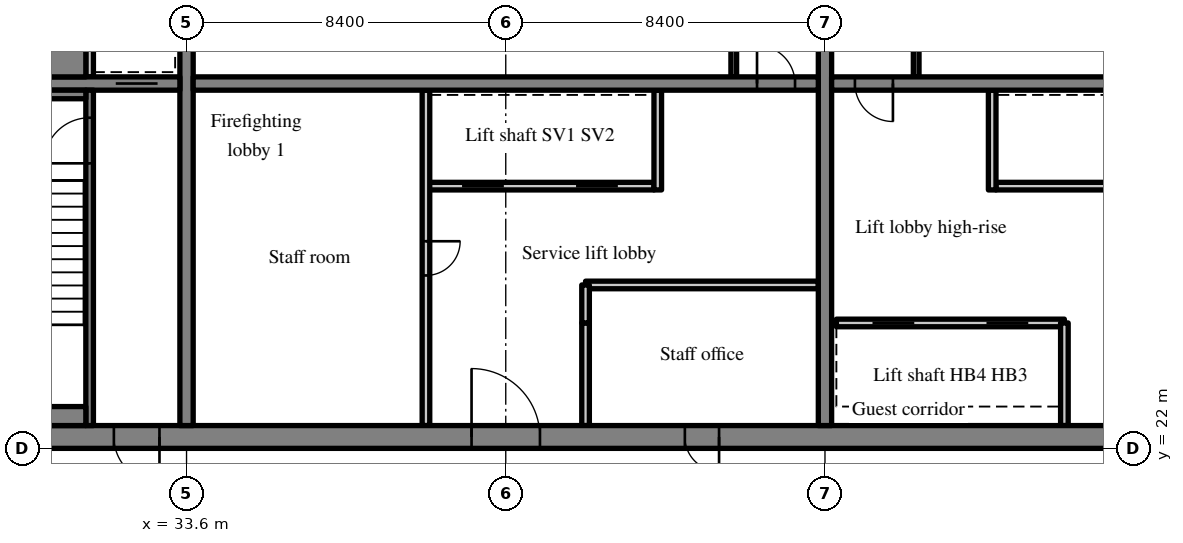
"""IFC4 building model, lengths in metres.
Left out: names, types, materials, properties, quantities, classifications, styles, units other than length and angle.
Written with IfcOpenShell. Run it as: python <this file> out.ifc"""

import sys

from ifc_helpers import new_model, si_unit, direction, frame, frame_2d, origin, place, context, subcontext, project, spatial, rectangle, extrude, source, transform, mapped, element, fill, save


model = new_model("IFC4")
c1 = context("Model", 3, precision=1e-05, world=origin(), true_north=direction((0.0, 1.0)))
c2 = subcontext(c1, "Body", "Model", "MODEL_VIEW")
j1 = project(units=[si_unit("LENGTHUNIT", "METRE"), si_unit("PLANEANGLEUNIT", "RADIAN")], contexts=[c1])
p1 = place(None, origin())
s1 = spatial("IfcSite", under=j1, at=p1, CompositionType="ELEMENT")
p2 = place(p1, origin())
s2 = spatial("IfcBuilding", under=s1, at=p2, CompositionType="ELEMENT")
p3 = place(p2, frame((0.0, 0.0, 256.9)))
s3 = spatial("IfcBuildingStorey", under=s2, at=p3, CompositionType="ELEMENT", Elevation=256.9)
m1 = source(origin(), c2, "Body", "SweptSolid", [
    extrude(rectangle(XDim=50.4, YDim=0.6, at=frame_2d((25.2, 0.0))), origin(), (0.0, 0.0, 1.0), 3.62),
])
p4 = place(p3, frame((25.2, 22.3, 0.0), z_axis=(0.0, 0.0, 1.0), x_axis=(1.0, 0.0, 0.0)))
e1 = element("IfcWall", 1, at=p4, inside=s3, PredefinedType="SHEAR", context=c2, shape_type="MappedRepresentation", body=[
    mapped(m1, transform((0.0, 0.0, 0.0), scale=1.0)),
])
m2 = source(origin(), c2, "Body", "SweptSolid", [
    extrude(rectangle(XDim=1.8, YDim=2.1, at=frame_2d((0.9, 1.05))), frame((0.0, 0.31, 0.0), z_axis=(0.0, -1.0, 0.0), x_axis=(1.0, 0.0, 0.0)), (0.0, 0.0, 1.0), 0.62),
])
p5 = place(p4, frame((15.9, 0.0, 0.0)))
e2 = element("IfcOpeningElement", 2, at=p5, cuts=e1, PredefinedType="OPENING", context=c2, shape_type="MappedRepresentation", body=[
    mapped(m2, transform((0.0, 0.0, 0.0), scale=1.0)),
])
m3 = source(origin(), c2, "Body", "SweptSolid", [
    extrude(rectangle(XDim=0.9, YDim=2.1, at=frame_2d((0.45, 1.05))), frame((0.0, 0.31, 0.0), z_axis=(0.0, -1.0, 0.0), x_axis=(1.0, 0.0, 0.0)), (0.0, 0.0, 1.0), 0.62),
])
p6 = place(p4, frame((21.513, 0.0, 0.0)))
e3 = element("IfcOpeningElement", 3, at=p6, cuts=e1, PredefinedType="OPENING", context=c2, shape_type="MappedRepresentation", body=[
    mapped(m3, transform((0.0, 0.0, 0.0), scale=1.0)),
])
p7 = place(p4, frame((32.7, 0.0, 0.0)))
e4 = element("IfcOpeningElement", 4, at=p7, cuts=e1, PredefinedType="OPENING", context=c2, shape_type="MappedRepresentation", body=[
    mapped(m2, transform((0.0, 0.0, 0.0), scale=1.0)),
])
m4 = source(origin(), c2, "Body", "SweptSolid", [
    extrude(rectangle(XDim=1.2, YDim=2.1, at=frame_2d((0.6, 1.05))), frame((0.0, 0.31, 0.0), z_axis=(0.0, -1.0, 0.0), x_axis=(1.0, 0.0, 0.0)), (0.0, 0.0, 1.0), 0.62),
])
p8 = place(p4, frame((6.488, 0.0, 0.0)))
e5 = element("IfcOpeningElement", 5, at=p8, cuts=e1, PredefinedType="OPENING", context=c2, shape_type="MappedRepresentation", body=[
    mapped(m4, transform((0.0, 0.0, 0.0), scale=1.0)),
])
p9 = place(p4, frame((47.925, 0.0, 0.0)))
e6 = element("IfcOpeningElement", 6, at=p9, cuts=e1, PredefinedType="OPENING", context=c2, shape_type="MappedRepresentation", body=[
    mapped(m4, transform((0.0, 0.0, 0.0), scale=1.0)),
])
m5 = source(origin(), c2, "Body", "SweptSolid", [
    extrude(rectangle(XDim=18.8, YDim=0.35, at=frame_2d((9.4, 0.0))), origin(), (0.0, 0.0, 1.0), 3.62),
])
p10 = place(p3, frame((33.6, 22.6, 0.0), z_axis=(0.0, 0.0, 1.0), x_axis=(0.0, 1.0, 0.0)))
e7 = element("IfcWall", 7, at=p10, inside=s3, PredefinedType="SHEAR", context=c2, shape_type="MappedRepresentation", body=[
    mapped(m5, transform((0.0, 0.0, 0.0), scale=1.0)),
])
m6 = source(origin(), c2, "Body", "SweptSolid", [
    extrude(rectangle(XDim=1.1, YDim=2.1, at=frame_2d((0.55, 1.05))), frame((0.0, 0.185, 0.0), z_axis=(0.0, -1.0, 0.0), x_axis=(1.0, 0.0, 0.0)), (0.0, 0.0, 1.0), 0.37),
])
p11 = place(p10, frame((12.85, 0.0, 0.0)))
e8 = element("IfcOpeningElement", 8, at=p11, cuts=e7, PredefinedType="OPENING", context=c2, shape_type="MappedRepresentation", body=[
    mapped(m6, transform((0.0, 0.0, 0.0), scale=1.0)),
])
p12 = place(p3, frame((50.4, 22.6, 0.0), z_axis=(0.0, 0.0, 1.0), x_axis=(0.0, 1.0, 0.0)))
e9 = element("IfcWall", 9, at=p12, inside=s3, PredefinedType="SHEAR", context=c2, shape_type="MappedRepresentation", body=[
    mapped(m5, transform((0.0, 0.0, 0.0), scale=1.0)),
])
p13 = place(p12, frame((12.85, 0.0, 0.0)))
e10 = element("IfcOpeningElement", 10, at=p13, cuts=e9, PredefinedType="OPENING", context=c2, shape_type="MappedRepresentation", body=[
    mapped(m6, transform((0.0, 0.0, 0.0), scale=1.0)),
])
m7 = source(origin(), c2, "Body", "SweptSolid", [
    extrude(rectangle(XDim=7.625, YDim=0.35, at=frame_2d((3.812, 0.0))), origin(), (0.0, 0.0, 1.0), 3.62),
])
p14 = place(p3, frame((25.8, 31.6, 0.0), z_axis=(0.0, 0.0, 1.0), x_axis=(1.0, 0.0, 0.0)))
e11 = element("IfcWall", 11, at=p14, inside=s3, PredefinedType="SHEAR", context=c2, shape_type="MappedRepresentation", body=[
    mapped(m7, transform((0.0, 0.0, 0.0), scale=1.0)),
])
p15 = place(p14, frame((5.938, 0.0, 0.0)))
e12 = element("IfcOpeningElement", 12, at=p15, cuts=e11, PredefinedType="OPENING", context=c2, shape_type="MappedRepresentation", body=[
    mapped(m6, transform((0.0, 0.0, 0.0), scale=1.0)),
])
m8 = source(origin(), c2, "Body", "SweptSolid", [
    extrude(rectangle(XDim=16.45, YDim=0.35, at=frame_2d((8.225, 0.0))), origin(), (0.0, 0.0, 1.0), 3.62),
])
p16 = place(p3, frame((33.775, 31.6, 0.0), z_axis=(0.0, 0.0, 1.0), x_axis=(1.0, 0.0, 0.0)))
e13 = element("IfcWall", 13, at=p16, inside=s3, PredefinedType="SHEAR", context=c2, shape_type="MappedRepresentation", body=[
    mapped(m8, transform((0.0, 0.0, 0.0), scale=1.0)),
])
m9 = source(origin(), c2, "Body", "SweptSolid", [
    extrude(rectangle(XDim=1.0, YDim=2.1, at=frame_2d((0.5, 1.05))), frame((0.0, 0.185, 0.0), z_axis=(0.0, -1.0, 0.0), x_axis=(1.0, 0.0, 0.0)), (0.0, 0.0, 1.0), 0.37),
])
p17 = place(p16, frame((14.837, 0.0, 0.0)))
e14 = element("IfcOpeningElement", 14, at=p17, cuts=e13, PredefinedType="OPENING", context=c2, shape_type="MappedRepresentation", body=[
    mapped(m9, transform((0.0, 0.0, 0.0), scale=1.0)),
])
m10 = source(origin(), c2, "Body", "SweptSolid", [
    extrude(rectangle(XDim=16.45, YDim=0.35, at=frame_2d((8.225, 0.0))), origin(), (0.0, 0.0, 1.0), 3.62),
])
p18 = place(p3, frame((50.575, 31.6, 0.0), z_axis=(0.0, 0.0, 1.0), x_axis=(1.0, 0.0, 0.0)))
e15 = element("IfcWall", 15, at=p18, inside=s3, PredefinedType="SHEAR", context=c2, shape_type="MappedRepresentation", body=[
    mapped(m10, transform((0.0, 0.0, 0.0), scale=1.0)),
])
p19 = place(p18, frame((0.613, 0.0, 0.0)))
e16 = element("IfcOpeningElement", 16, at=p19, cuts=e15, PredefinedType="OPENING", context=c2, shape_type="MappedRepresentation", body=[
    mapped(m9, transform((0.0, 0.0, 0.0), scale=1.0)),
])
m11 = source(origin(), c2, "Body", "SweptSolid", [
    extrude(rectangle(XDim=6.0, YDim=0.2, at=frame_2d((3.0, 0.0))), origin(), (0.0, 0.0, 1.0), 3.62),
])
p20 = place(p3, frame((39.9, 28.9, 0.0), z_axis=(0.0, 0.0, 1.0), x_axis=(1.0, 0.0, 0.0)))
e17 = element("IfcWall", 17, at=p20, inside=s3, PredefinedType="SOLIDWALL", context=c2, shape_type="MappedRepresentation", body=[
    mapped(m11, transform((0.0, 0.0, 0.0), scale=1.0)),
])
m12 = source(origin(), c2, "Body", "SweptSolid", [
    extrude(rectangle(XDim=1.1, YDim=2.1, at=frame_2d((0.55, 1.05))), frame((0.0, 0.11, 0.0), z_axis=(0.0, -1.0, 0.0), x_axis=(1.0, 0.0, 0.0)), (0.0, 0.0, 1.0), 0.22),
])
p21 = place(p20, frame((0.95, 0.0, 0.0)))
e18 = element("IfcOpeningElement", 18, at=p21, cuts=e17, PredefinedType="OPENING", context=c2, shape_type="MappedRepresentation", body=[
    mapped(m12, transform((0.0, 0.0, 0.0), scale=1.0)),
])
p22 = place(p20, frame((3.95, 0.0, 0.0)))
e19 = element("IfcOpeningElement", 19, at=p22, cuts=e17, PredefinedType="OPENING", context=c2, shape_type="MappedRepresentation", body=[
    mapped(m12, transform((0.0, 0.0, 0.0), scale=1.0)),
])
m13 = source(origin(), c2, "Body", "SweptSolid", [
    extrude(rectangle(XDim=8.825, YDim=0.2, at=frame_2d((4.413, 0.0))), origin(), (0.0, 0.0, 1.0), 3.62),
])
p23 = place(p3, frame((39.9, 22.6, 0.0), z_axis=(0.0, 0.0, 1.0), x_axis=(0.0, 1.0, 0.0)))
e20 = element("IfcWall", 20, at=p23, inside=s3, PredefinedType="PARTITIONING", context=c2, shape_type="MappedRepresentation", body=[
    mapped(m13, transform((0.0, 0.0, 0.0), scale=1.0)),
])
m14 = source(origin(), c2, "Body", "SweptSolid", [
    extrude(rectangle(XDim=0.9, YDim=2.1, at=frame_2d((0.45, 1.05))), frame((0.0, 0.11, 0.0), z_axis=(0.0, -1.0, 0.0), x_axis=(1.0, 0.0, 0.0)), (0.0, 0.0, 1.0), 0.22),
])
p24 = place(p23, frame((3.95, 0.0, 0.0)))
e21 = element("IfcOpeningElement", 21, at=p24, cuts=e20, PredefinedType="OPENING", context=c2, shape_type="MappedRepresentation", body=[
    mapped(m14, transform((0.0, 0.0, 0.0), scale=1.0)),
])
m15 = source(origin(), c2, "Body", "SweptSolid", [
    extrude(rectangle(XDim=2.7, YDim=0.2, at=frame_2d((1.35, 0.0))), origin(), (0.0, 0.0, 1.0), 3.62),
])
p25 = place(p3, frame((44.1, 22.6, 0.0), z_axis=(0.0, 0.0, 1.0), x_axis=(0.0, 1.0, 0.0)))
e22 = element("IfcWall", 22, at=p25, inside=s3, PredefinedType="PARTITIONING", context=c2, shape_type="MappedRepresentation", body=[
    mapped(m15, transform((0.0, 0.0, 0.0), scale=1.0)),
])
m16 = source(origin(), c2, "Body", "SweptSolid", [
    extrude(rectangle(XDim=2.625, YDim=0.2, at=frame_2d((1.312, 0.0))), origin(), (0.0, 0.0, 1.0), 3.62),
])
p26 = place(p3, frame((46.0, 28.8, 0.0), z_axis=(0.0, 0.0, 1.0), x_axis=(0.0, 1.0, 0.0)))
e23 = element("IfcWall", 23, at=p26, inside=s3, PredefinedType="SOLIDWALL", context=c2, shape_type="MappedRepresentation", body=[
    mapped(m16, transform((0.0, 0.0, 0.0), scale=1.0)),
])
m17 = source(origin(), c2, "Body", "SweptSolid", [
    extrude(rectangle(XDim=6.125, YDim=0.2, at=frame_2d((3.062, 0.0))), origin(), (0.0, 0.0, 1.0), 3.62),
])
p27 = place(p3, frame((44.1, 26.3, 0.0), z_axis=(0.0, 0.0, 1.0), x_axis=(1.0, 0.0, 0.0)))
e24 = element("IfcWall", 24, at=p27, inside=s3, PredefinedType="PARTITIONING", context=c2, shape_type="MappedRepresentation", body=[
    mapped(m17, transform((0.0, 0.0, 0.0), scale=1.0)),
])
m18 = source(origin(), c2, "Body", "SweptSolid", [
    extrude(rectangle(XDim=1.0, YDim=0.2, at=frame_2d((0.5, 0.0))), origin(), (0.0, 0.0, 1.0), 3.62),
])
p28 = place(p3, frame((44.1, 25.3, 0.0), z_axis=(0.0, 0.0, 1.0), x_axis=(0.0, 1.0, 0.0)))
e25 = element("IfcWall", 25, at=p28, inside=s3, PredefinedType="PARTITIONING", context=c2, shape_type="MappedRepresentation", body=[
    mapped(m18, transform((0.0, 0.0, 0.0), scale=1.0)),
])
m19 = source(origin(), c2, "Body", "SweptSolid", [
    extrude(rectangle(XDim=3.225, YDim=0.15, at=frame_2d((1.613, 0.0))), origin(), (0.0, 0.0, 1.0), 3.62),
])
p29 = place(p3, frame((48.0, 31.775, 0.0), z_axis=(0.0, 0.0, 1.0), x_axis=(0.0, 1.0, 0.0)))
e26 = element("IfcWall", 26, at=p29, inside=s3, PredefinedType="PARTITIONING", context=c2, shape_type="MappedRepresentation", body=[
    mapped(m19, transform((0.0, 0.0, 0.0), scale=1.0)),
])
p30 = place(p3, frame((56.7, 25.3, 0.0), z_axis=(0.0, 0.0, 1.0), x_axis=(-1.0, 0.0, 0.0)))
e27 = element("IfcWall", 27, at=p30, inside=s3, PredefinedType="SOLIDWALL", context=c2, shape_type="MappedRepresentation", body=[
    mapped(m11, transform((0.0, 0.0, 0.0), scale=1.0)),
])
p31 = place(p30, frame((0.95, 0.0, 0.0)))
e28 = element("IfcOpeningElement", 28, at=p31, cuts=e27, PredefinedType="OPENING", context=c2, shape_type="MappedRepresentation", body=[
    mapped(m12, transform((0.0, 0.0, 0.0), scale=1.0)),
])
p32 = place(p30, frame((3.95, 0.0, 0.0)))
e29 = element("IfcOpeningElement", 29, at=p32, cuts=e27, PredefinedType="OPENING", context=c2, shape_type="MappedRepresentation", body=[
    mapped(m12, transform((0.0, 0.0, 0.0), scale=1.0)),
])
m20 = source(origin(), c2, "Body", "SweptSolid", [
    extrude(rectangle(XDim=12.125, YDim=0.2, at=frame_2d((6.062, 0.0))), origin(), (0.0, 0.0, 1.0), 3.62),
])
p33 = place(p3, frame((67.025, 28.9, 0.0), z_axis=(0.0, 0.0, 1.0), x_axis=(-1.0, 0.0, 0.0)))
e30 = element("IfcWall", 30, at=p33, inside=s3, PredefinedType="SOLIDWALL", context=c2, shape_type="MappedRepresentation", body=[
    mapped(m20, transform((0.0, 0.0, 0.0), scale=1.0)),
])
p34 = place(p33, frame((1.075, 0.0, 0.0)))
e31 = element("IfcOpeningElement", 31, at=p34, cuts=e30, PredefinedType="OPENING", context=c2, shape_type="MappedRepresentation", body=[
    mapped(m12, transform((0.0, 0.0, 0.0), scale=1.0)),
])
p35 = place(p33, frame((4.075, 0.0, 0.0)))
e32 = element("IfcOpeningElement", 32, at=p35, cuts=e30, PredefinedType="OPENING", context=c2, shape_type="MappedRepresentation", body=[
    mapped(m12, transform((0.0, 0.0, 0.0), scale=1.0)),
])
p36 = place(p3, frame((56.7, 22.6, 0.0), z_axis=(0.0, 0.0, 1.0), x_axis=(0.0, 1.0, 0.0)))
e33 = element("IfcWall", 33, at=p36, inside=s3, PredefinedType="SOLIDWALL", context=c2, shape_type="MappedRepresentation", body=[
    mapped(m15, transform((0.0, 0.0, 0.0), scale=1.0)),
])
p37 = place(p3, frame((54.8, 28.8, 0.0), z_axis=(0.0, 0.0, 1.0), x_axis=(0.0, 1.0, 0.0)))
e34 = element("IfcWall", 34, at=p37, inside=s3, PredefinedType="SOLIDWALL", context=c2, shape_type="MappedRepresentation", body=[
    mapped(m16, transform((0.0, 0.0, 0.0), scale=1.0)),
])
p38 = place(p3, frame((52.8, 31.775, 0.0), z_axis=(0.0, 0.0, 1.0), x_axis=(0.0, 1.0, 0.0)))
e35 = element("IfcWall", 35, at=p38, inside=s3, PredefinedType="PARTITIONING", context=c2, shape_type="MappedRepresentation", body=[
    mapped(m19, transform((0.0, 0.0, 0.0), scale=1.0)),
])
m21 = source(origin(), c2, "Body", "SweptSolid", [
    extrude(rectangle(XDim=8.825, YDim=0.2, at=frame_2d((4.413, 0.0))), origin(), (0.0, 0.0, 1.0), 3.62),
])
p39 = place(p3, frame((31.05, 22.6, 0.0), z_axis=(0.0, 0.0, 1.0), x_axis=(0.0, 1.0, 0.0)))
e36 = element("IfcWall", 36, at=p39, inside=s3, PredefinedType="SOLIDWALL", context=c2, shape_type="MappedRepresentation", body=[
    mapped(m21, transform((0.0, 0.0, 0.0), scale=1.0)),
])
m22 = source(origin(), c2, "Body", "SweptSolid", [
    extrude(rectangle(XDim=1.2, YDim=2.1, at=frame_2d((0.6, 1.05))), frame((0.0, 0.11, 0.0), z_axis=(0.0, -1.0, 0.0), x_axis=(1.0, 0.0, 0.0)), (0.0, 0.0, 1.0), 0.22),
])
p40 = place(p39, frame((6.9, 0.0, 0.0)))
e37 = element("IfcOpeningElement", 37, at=p40, cuts=e36, PredefinedType="OPENING", context=c2, shape_type="MappedRepresentation", body=[
    mapped(m22, transform((0.0, 0.0, 0.0), scale=1.0)),
])
m23 = source(origin(), c2, "Body", "SweptSolid", [
    extrude(rectangle(XDim=1.825, YDim=0.2, at=frame_2d((0.913, 0.0))), origin(), (0.0, 0.0, 1.0), 3.62),
])
p41 = place(p3, frame((31.05, 31.775, 0.0), z_axis=(0.0, 0.0, 1.0), x_axis=(0.0, 1.0, 0.0)))
e38 = element("IfcWall", 38, at=p41, inside=s3, PredefinedType="SOLIDWALL", context=c2, shape_type="MappedRepresentation", body=[
    mapped(m23, transform((0.0, 0.0, 0.0), scale=1.0)),
])
m24 = source(origin(), c2, "Body", "SweptSolid", [
    extrude(rectangle(XDim=5.15, YDim=0.5, at=frame_2d((2.575, 0.0))), origin(), (0.0, 0.0, 1.0), 3.62),
])
p42 = place(p3, frame((25.8, 22.85, 0.0), z_axis=(0.0, 0.0, 1.0), x_axis=(1.0, 0.0, 0.0)))
e39 = element("IfcWall", 39, at=p42, inside=s3, PredefinedType="SOLIDWALL", context=c2, shape_type="MappedRepresentation", body=[
    mapped(m24, transform((0.0, 0.0, 0.0), scale=1.0)),
])
m25 = source(origin(), c2, "Body", "SweptSolid", [
    extrude(rectangle(XDim=5.15, YDim=0.225, at=frame_2d((2.575, 0.0))), origin(), (0.0, 0.0, 1.0), 3.62),
])
p43 = place(p3, frame((25.8, 31.312, 0.0), z_axis=(0.0, 0.0, 1.0), x_axis=(1.0, 0.0, 0.0)))
e40 = element("IfcWall", 40, at=p43, inside=s3, PredefinedType="SOLIDWALL", context=c2, shape_type="MappedRepresentation", body=[
    mapped(m25, transform((0.0, 0.0, 0.0), scale=1.0)),
])
m26 = source(origin(), c2, "Body", "SweptSolid", [
    extrude(rectangle(XDim=5.15, YDim=1.025, at=frame_2d((2.575, 0.0))), origin(), (0.0, 0.0, 1.0), 3.62),
])
p44 = place(p3, frame((25.8, 32.287, 0.0), z_axis=(0.0, 0.0, 1.0), x_axis=(1.0, 0.0, 0.0)))
e41 = element("IfcWall", 41, at=p44, inside=s3, PredefinedType="SOLIDWALL", context=c2, shape_type="MappedRepresentation", body=[
    mapped(m26, transform((0.0, 0.0, 0.0), scale=1.0)),
])
m27 = source(origin(), c2, "Body", "SweptSolid", [
    extrude(rectangle(XDim=1.8, YDim=2.1, at=frame_2d((0.9, 1.05))), frame((0.0, 0.225, 0.0), z_axis=(0.0, -1.0, 0.0), x_axis=(1.0, 0.0, 0.0)), (0.0, 0.0, 1.0), 0.05),
])
p45 = place(p5, origin())
e42 = element("IfcDoor", 42, at=p45, inside=s3, OperationType="DOUBLE_DOOR_SINGLE_SWING", PredefinedType="DOOR", context=c2, shape_type="MappedRepresentation", body=[
    mapped(m27, transform((0.0, 0.0, 0.0), scale=1.0)),
])
fill(e2, e42)
m28 = source(origin(), c2, "Body", "SweptSolid", [
    extrude(rectangle(XDim=1.0, YDim=2.1, at=frame_2d((0.5, 1.05))), frame((0.0, 0.025, 0.0), z_axis=(0.0, -1.0, 0.0), x_axis=(1.0, 0.0, 0.0)), (0.0, 0.0, 1.0), 0.05),
])
p46 = place(p17, origin())
e43 = element("IfcDoor", 43, at=p46, inside=s3, OperationType="SINGLE_SWING_LEFT", PredefinedType="DOOR", context=c2, shape_type="MappedRepresentation", body=[
    mapped(m28, transform((0.0, 0.0, 0.0), scale=1.0)),
])
fill(e14, e43)
m29 = source(origin(), c2, "Body", "SweptSolid", [
    extrude(rectangle(XDim=1.1, YDim=2.1, at=frame_2d((0.55, 1.05))), frame((0.0, 0.025, 0.0), z_axis=(0.0, -1.0, 0.0), x_axis=(1.0, 0.0, 0.0)), (0.0, 0.0, 1.0), 0.05),
])
p47 = place(p21, origin())
e44 = element("IfcDoor", 44, at=p47, inside=s3, OperationType="SLIDING_TO_LEFT", PredefinedType="DOOR", context=c2, shape_type="MappedRepresentation", body=[
    mapped(m29, transform((0.0, 0.0, 0.0), scale=1.0)),
])
fill(e18, e44)
p48 = place(p22, origin())
e45 = element("IfcDoor", 45, at=p48, inside=s3, OperationType="SLIDING_TO_RIGHT", PredefinedType="DOOR", context=c2, shape_type="MappedRepresentation", body=[
    mapped(m29, transform((0.0, 0.0, 0.0), scale=1.0)),
])
fill(e19, e45)
m30 = source(origin(), c2, "Body", "SweptSolid", [
    extrude(rectangle(XDim=0.9, YDim=2.1, at=frame_2d((0.45, 1.05))), frame((0.0, 0.025, 0.0), z_axis=(0.0, -1.0, 0.0), x_axis=(1.0, 0.0, 0.0)), (0.0, 0.0, 1.0), 0.05),
])
p49 = place(p24, origin())
e46 = element("IfcDoor", 46, at=p49, inside=s3, OperationType="SINGLE_SWING_RIGHT", PredefinedType="DOOR", context=c2, shape_type="MappedRepresentation", body=[
    mapped(m30, transform((0.0, 0.0, 0.0), scale=1.0)),
])
fill(e21, e46)
m31 = source(origin(), c2, "Body", "SweptSolid", [
    extrude(rectangle(XDim=0.9, YDim=2.1, at=frame_2d((0.45, 1.05))), frame((0.0, 0.225, 0.0), z_axis=(0.0, -1.0, 0.0), x_axis=(1.0, 0.0, 0.0)), (0.0, 0.0, 1.0), 0.05),
])
p50 = place(p6, origin())
e47 = element("IfcDoor", 47, at=p50, inside=s3, OperationType="SINGLE_SWING_RIGHT", PredefinedType="DOOR", context=c2, shape_type="MappedRepresentation", body=[
    mapped(m31, transform((0.0, 0.0, 0.0), scale=1.0)),
])
fill(e3, e47)
p51 = place(p19, origin())
e48 = element("IfcDoor", 48, at=p51, inside=s3, OperationType="SINGLE_SWING_RIGHT", PredefinedType="DOOR", context=c2, shape_type="MappedRepresentation", body=[
    mapped(m28, transform((0.0, 0.0, 0.0), scale=1.0)),
])
fill(e16, e48)
p52 = place(p31, origin())
e49 = element("IfcDoor", 49, at=p52, inside=s3, OperationType="SLIDING_TO_RIGHT", PredefinedType="DOOR", context=c2, shape_type="MappedRepresentation", body=[
    mapped(m29, transform((0.0, 0.0, 0.0), scale=1.0)),
])
fill(e28, e49)
p53 = place(p32, origin())
e50 = element("IfcDoor", 50, at=p53, inside=s3, OperationType="SLIDING_TO_LEFT", PredefinedType="DOOR", context=c2, shape_type="MappedRepresentation", body=[
    mapped(m29, transform((0.0, 0.0, 0.0), scale=1.0)),
])
fill(e29, e50)
m32 = source(origin(), c2, "Body", "SweptSolid", [
    extrude(rectangle(XDim=1.2, YDim=2.1, at=frame_2d((0.6, 1.05))), frame((0.0, 0.025, 0.0), z_axis=(0.0, -1.0, 0.0), x_axis=(1.0, 0.0, 0.0)), (0.0, 0.0, 1.0), 0.05),
])
p54 = place(p40, origin())
e51 = element("IfcDoor", 51, at=p54, inside=s3, OperationType="SINGLE_SWING_LEFT", PredefinedType="DOOR", context=c2, shape_type="MappedRepresentation", body=[
    mapped(m32, transform((0.0, 0.0, 0.0), scale=1.0)),
])
fill(e37, e51)
m33 = source(origin(), c2, "Body", "SweptSolid", [
    extrude(rectangle(XDim=1.2, YDim=2.1, at=frame_2d((0.6, 1.05))), frame((0.0, 0.225, 0.0), z_axis=(0.0, -1.0, 0.0), x_axis=(1.0, 0.0, 0.0)), (0.0, 0.0, 1.0), 0.05),
])
p55 = place(p8, origin())
e52 = element("IfcDoor", 52, at=p55, inside=s3, OperationType="SINGLE_SWING_RIGHT", PredefinedType="DOOR", context=c2, shape_type="MappedRepresentation", body=[
    mapped(m33, transform((0.0, 0.0, 0.0), scale=1.0)),
])
fill(e5, e52)
p56 = place(p15, origin())
e53 = element("IfcDoor", 53, at=p56, inside=s3, OperationType="SLIDING_TO_RIGHT", PredefinedType="DOOR", context=c2, shape_type="MappedRepresentation", body=[
    mapped(m29, transform((0.0, 0.0, 0.0), scale=1.0)),
])
fill(e12, e53)
save(model, sys.argv[1])
